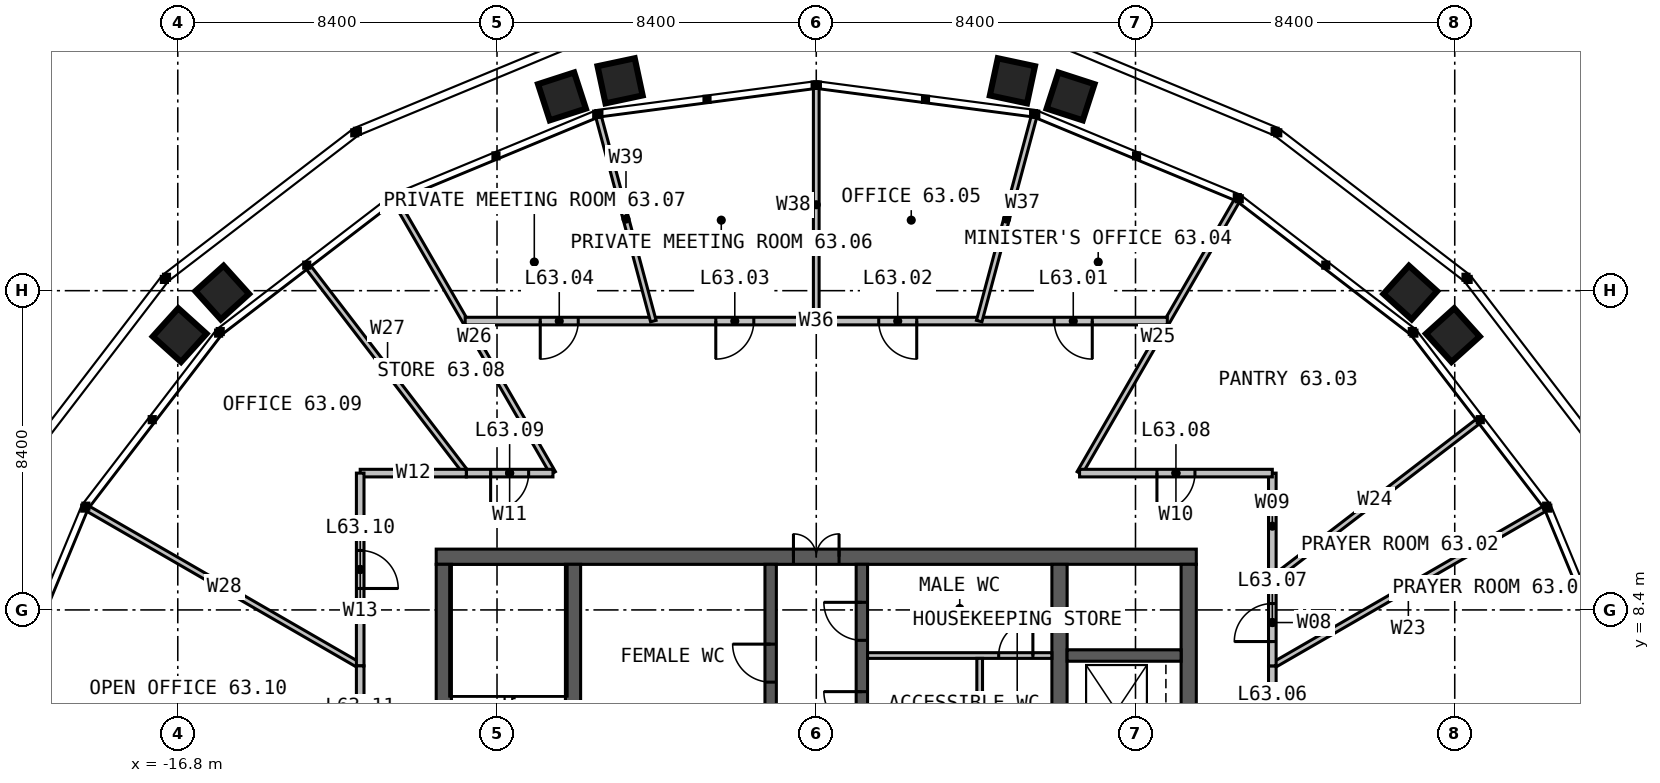
"""IFC4 building model, lengths in metres.
Left out: names, types, materials, properties, quantities, classifications, styles, units other than length and angle.
Written with IfcOpenShell. Run it as: python <this file> out.ifc"""

import sys

from ifc_helpers import new_model, si_unit, direction, frame, frame_2d, origin, place, context, subcontext, project, spatial, rectangle, extrude, element, fill, save


model = new_model("IFC4")
c1 = context("Model", 3, precision=1e-05, world=origin(), true_north=direction((0.0, 1.0)))
c2 = subcontext(c1, "Body", "Model", "MODEL_VIEW")
j1 = project(units=[si_unit("LENGTHUNIT", "METRE"), si_unit("PLANEANGLEUNIT", "RADIAN")], contexts=[c1])
p1 = place(None, origin())
s1 = spatial("IfcSite", under=j1, at=p1, CompositionType="ELEMENT")
p2 = place(p1, origin())
s2 = spatial("IfcBuilding", under=s1, at=p2, CompositionType="ELEMENT")
p3 = place(p2, frame((0.0, 0.0, 260.0)))
s3 = spatial("IfcBuildingStorey", under=s2, at=p3, CompositionType="ELEMENT", Elevation=260.0)
p4 = place(p3, frame((-10.0, 9.8, 0.0), z_axis=(0.0, 0.0, 1.0), x_axis=(1.0, 0.0, 0.0)))
e1 = element("IfcWall", 1, at=p4, inside=s3, PredefinedType="SOLIDWALL", context=c2, shape_type="SweptSolid", body=[
    extrude(rectangle(XDim=20.0, YDim=0.4, at=frame_2d((10.0, 0.0))), origin(), (0.0, 0.0, 1.0), 4.0),
])
p5 = place(p4, frame((9.4, 0.0, 0.0)))
e2 = element("IfcOpeningElement", 2, at=p5, cuts=e1, PredefinedType="OPENING", context=c2, shape_type="SweptSolid", body=[
    extrude(rectangle(XDim=1.2, YDim=2.2, at=frame_2d((0.6, 1.1))), frame((0.0, 0.21, 0.0), z_axis=(0.0, -1.0, 0.0), x_axis=(1.0, 0.0, 0.0)), (0.0, 0.0, 1.0), 0.42),
])
for number, where, z_axis, x_axis in (
    (3, (9.8, -9.6, 0.0), (0.0, 0.0, 1.0), (0.0, 1.0, 0.0)),
    (4, (-9.8, 9.6, 0.0), (0.0, 0.0, 1.0), (0.0, -1.0, 0.0)),
):
    element("IfcWall", number, at=place(p3, frame(where, z_axis=z_axis, x_axis=x_axis)), inside=s3, PredefinedType="SOLIDWALL", context=c2, shape_type="SweptSolid", body=[
        extrude(rectangle(XDim=19.2, YDim=0.4, at=frame_2d((9.6, 0.0))), origin(), (0.0, 0.0, 1.0), 4.0),
    ])
p6 = place(p3, frame((-6.4, -9.6, 0.0), z_axis=(0.0, 0.0, 1.0), x_axis=(0.0, 1.0, 0.0)))
e5 = element("IfcWall", 5, at=p6, inside=s3, PredefinedType="SOLIDWALL", context=c2, shape_type="SweptSolid", body=[
    extrude(rectangle(XDim=19.2, YDim=0.4, at=frame_2d((9.6, 0.0))), origin(), (0.0, 0.0, 1.0), 4.0),
])
p7 = place(p6, frame((9.1, 0.0, 0.0)))
e6 = element("IfcOpeningElement", 6, at=p7, cuts=e5, PredefinedType="OPENING", context=c2, shape_type="SweptSolid", body=[
    extrude(rectangle(XDim=1.0, YDim=2.2, at=frame_2d((0.5, 1.1))), frame((0.0, 0.21, 0.0), z_axis=(0.0, -1.0, 0.0), x_axis=(1.0, 0.0, 0.0)), (0.0, 0.0, 1.0), 0.42),
])
p8 = place(p3, frame((6.4, 9.6, 0.0), z_axis=(0.0, 0.0, 1.0), x_axis=(0.0, -1.0, 0.0)))
e7 = element("IfcWall", 7, at=p8, inside=s3, PredefinedType="SOLIDWALL", context=c2, shape_type="SweptSolid", body=[
    extrude(rectangle(XDim=19.2, YDim=0.4, at=frame_2d((9.6, 0.0))), origin(), (0.0, 0.0, 1.0), 4.0),
])
p9 = place(p8, frame((9.1, 0.0, 0.0)))
e8 = element("IfcOpeningElement", 8, at=p9, cuts=e7, PredefinedType="OPENING", context=c2, shape_type="SweptSolid", body=[
    extrude(rectangle(XDim=1.0, YDim=2.2, at=frame_2d((0.5, 1.1))), frame((0.0, 0.21, 0.0), z_axis=(0.0, -1.0, 0.0), x_axis=(1.0, 0.0, 0.0)), (0.0, 0.0, 1.0), 0.42),
])
p10 = place(p3, frame((-1.2, 1.45, 0.0), z_axis=(0.0, 0.0, 1.0), x_axis=(0.0, 1.0, 0.0)))
e9 = element("IfcWall", 9, at=p10, inside=s3, PredefinedType="SOLIDWALL", context=c2, shape_type="SweptSolid", body=[
    extrude(rectangle(XDim=8.15, YDim=0.3, at=frame_2d((4.075, 0.0))), origin(), (0.0, 0.0, 1.0), 4.0),
])
p11 = place(p10, frame((5.05, 0.0, 0.0)))
e10 = element("IfcOpeningElement", 10, at=p11, cuts=e9, PredefinedType="OPENING", context=c2, shape_type="SweptSolid", body=[
    extrude(rectangle(XDim=1.0, YDim=2.2, at=frame_2d((0.5, 1.1))), frame((0.0, 0.16, 0.0), z_axis=(0.0, -1.0, 0.0), x_axis=(1.0, 0.0, 0.0)), (0.0, 0.0, 1.0), 0.32),
])
p12 = place(p3, frame((1.2, 1.45, 0.0), z_axis=(0.0, 0.0, 1.0), x_axis=(0.0, 1.0, 0.0)))
e11 = element("IfcWall", 11, at=p12, inside=s3, PredefinedType="SOLIDWALL", context=c2, shape_type="SweptSolid", body=[
    extrude(rectangle(XDim=8.15, YDim=0.3, at=frame_2d((4.075, 0.0))), origin(), (0.0, 0.0, 1.0), 4.0),
])
p13 = place(p12, frame((3.8, 0.0, 0.0)))
e12 = element("IfcOpeningElement", 12, at=p13, cuts=e11, PredefinedType="OPENING", context=c2, shape_type="SweptSolid", body=[
    extrude(rectangle(XDim=1.0, YDim=2.2, at=frame_2d((0.5, 1.1))), frame((0.0, 0.16, 0.0), z_axis=(0.0, -1.0, 0.0), x_axis=(1.0, 0.0, 0.0)), (0.0, 0.0, 1.0), 0.32),
])
p14 = place(p12, frame((6.15, 0.0, 0.0)))
e13 = element("IfcOpeningElement", 13, at=p14, cuts=e11, PredefinedType="OPENING", context=c2, shape_type="SweptSolid", body=[
    extrude(rectangle(XDim=1.0, YDim=2.2, at=frame_2d((0.5, 1.1))), frame((0.0, 0.16, 0.0), z_axis=(0.0, -1.0, 0.0), x_axis=(1.0, 0.0, 0.0)), (0.0, 0.0, 1.0), 0.32),
])
p15 = place(p3, frame((6.6, 7.2, 0.0), z_axis=(0.0, 0.0, 1.0), x_axis=(1.0, 0.0, 0.0)))
e14 = element("IfcWall", 14, at=p15, inside=s3, PredefinedType="SOLIDWALL", context=c2, shape_type="SweptSolid", body=[
    extrude(rectangle(XDim=3.0, YDim=0.3, at=frame_2d((1.5, 0.0))), origin(), (0.0, 0.0, 1.0), 4.0),
])
p16 = place(p3, frame((1.35, 7.2, 0.0), z_axis=(0.0, 0.0, 1.0), x_axis=(1.0, 0.0, 0.0)))
e15 = element("IfcWall", 15, at=p16, inside=s3, PredefinedType="PARTITIONING", context=c2, shape_type="SweptSolid", body=[
    extrude(rectangle(XDim=4.85, YDim=0.15, at=frame_2d((2.425, 0.0))), origin(), (0.0, 0.0, 1.0), 3.75),
])
p17 = place(p16, frame((3.45, 0.0, 0.0)))
e16 = element("IfcOpeningElement", 16, at=p17, cuts=e15, PredefinedType="OPENING", context=c2, shape_type="SweptSolid", body=[
    extrude(rectangle(XDim=0.9, YDim=2.2, at=frame_2d((0.45, 1.1))), frame((0.0, 0.085, 0.0), z_axis=(0.0, -1.0, 0.0), x_axis=(1.0, 0.0, 0.0)), (0.0, 0.0, 1.0), 0.17),
])
p18 = place(p3, frame((4.3, 4.75, 0.0), z_axis=(0.0, 0.0, 1.0), x_axis=(0.0, 1.0, 0.0)))
e17 = element("IfcWall", 17, at=p18, inside=s3, PredefinedType="PARTITIONING", context=c2, shape_type="SweptSolid", body=[
    extrude(rectangle(XDim=2.375, YDim=0.15, at=frame_2d((1.188, 0.0))), origin(), (0.0, 0.0, 1.0), 3.75),
])
p19 = place(p3, frame((12.0, 6.928, 0.0), z_axis=(0.0, 0.0, 1.0), x_axis=(0.86603163534, 0.499989206474, 0.0)))
e18 = element("IfcWall", 18, at=p19, inside=s3, PredefinedType="PARTITIONING", context=c2, shape_type="SweptSolid", body=[
    extrude(rectangle(XDim=8.266, YDim=0.15, at=frame_2d((4.133, 0.0))), origin(), (0.0, 0.0, 1.0), 2.79),
])
p20 = place(p3, frame((12.0, 9.208, 0.0), z_axis=(0.0, 0.0, 1.0), x_axis=(0.793354038351, 0.608760519279, 0.0)))
e19 = element("IfcWall", 19, at=p20, inside=s3, PredefinedType="PARTITIONING", context=c2, shape_type="SweptSolid", body=[
    extrude(rectangle(XDim=6.807, YDim=0.15, at=frame_2d((3.404, 0.0))), origin(), (0.0, 0.0, 1.0), 2.79),
])
for number, where, z_axis, x_axis in (
    (20, (6.928, 12.0, 0.0), (0.0, 0.0, 1.0), (0.5, 0.866, 0.0)),
    (21, (-6.928, 12.0, 0.0), (0.0, 0.0, 1.0), (-0.5, 0.866, 0.0)),
):
    element("IfcWall", number, at=place(p3, frame(where, z_axis=z_axis, x_axis=x_axis)), inside=s3, PredefinedType="PARTITIONING", context=c2, shape_type="SweptSolid", body=[
        extrude(rectangle(XDim=8.266, YDim=0.15, at=frame_2d((4.133, 0.0))), origin(), (0.0, 0.0, 1.0), 2.79),
    ])
p21 = place(p3, frame((-9.208, 12.0, 0.0), z_axis=(0.0, 0.0, 1.0), x_axis=(-0.608760519279, 0.793354038351, 0.0)))
e22 = element("IfcWall", 22, at=p21, inside=s3, PredefinedType="PARTITIONING", context=c2, shape_type="SweptSolid", body=[
    extrude(rectangle(XDim=6.807, YDim=0.15, at=frame_2d((3.404, 0.0))), origin(), (0.0, 0.0, 1.0), 2.79),
])
p22 = place(p3, frame((-12.0, 6.928, 0.0), z_axis=(0.0, 0.0, 1.0), x_axis=(-0.86603163534, 0.499989206474, 0.0)))
e23 = element("IfcWall", 23, at=p22, inside=s3, PredefinedType="PARTITIONING", context=c2, shape_type="SweptSolid", body=[
    extrude(rectangle(XDim=8.266, YDim=0.15, at=frame_2d((4.133, 0.0))), origin(), (0.0, 0.0, 1.0), 2.79),
])
p23 = place(p3, frame((12.0, 3.215, 0.0), z_axis=(0.0, 0.0, 1.0), x_axis=(0.0, 1.0, 0.0)))
e24 = element("IfcWall", 24, at=p23, inside=s3, PredefinedType="PARTITIONING", context=c2, shape_type="SweptSolid", body=[
    extrude(rectangle(XDim=3.713, YDim=0.2, at=frame_2d((1.856, 0.0))), origin(), (0.0, 0.0, 1.0), 3.8),
])
p24 = place(p23, frame((1.356, 0.0, 0.0)))
e25 = element("IfcOpeningElement", 25, at=p24, cuts=e24, PredefinedType="OPENING", context=c2, shape_type="SweptSolid", body=[
    extrude(rectangle(XDim=1.0, YDim=2.2, at=frame_2d((0.5, 1.1))), frame((0.0, 0.11, 0.0), z_axis=(0.0, -1.0, 0.0), x_axis=(1.0, 0.0, 0.0)), (0.0, 0.0, 1.0), 0.22),
])
p25 = place(p3, frame((12.0, 6.928, 0.0), z_axis=(0.0, 0.0, 1.0), x_axis=(0.0, 1.0, 0.0)))
e26 = element("IfcWall", 26, at=p25, inside=s3, PredefinedType="PARTITIONING", context=c2, shape_type="SweptSolid", body=[
    extrude(rectangle(XDim=2.28, YDim=0.2, at=frame_2d((1.14, 0.0))), origin(), (0.0, 0.0, 1.0), 3.8),
])
p26 = place(p25, frame((0.64, 0.0, 0.0)))
e27 = element("IfcOpeningElement", 27, at=p26, cuts=e26, PredefinedType="OPENING", context=c2, shape_type="SweptSolid", body=[
    extrude(rectangle(XDim=1.0, YDim=2.2, at=frame_2d((0.5, 1.1))), frame((0.0, 0.11, 0.0), z_axis=(0.0, -1.0, 0.0), x_axis=(1.0, 0.0, 0.0)), (0.0, 0.0, 1.0), 0.22),
])
p27 = place(p3, frame((12.0, 9.208, 0.0), z_axis=(0.0, 0.0, 1.0), x_axis=(0.0, 1.0, 0.0)))
e28 = element("IfcWall", 28, at=p27, inside=s3, PredefinedType="PARTITIONING", context=c2, shape_type="SweptSolid", body=[
    extrude(rectangle(XDim=2.792, YDim=0.2, at=frame_2d((1.396, 0.0))), origin(), (0.0, 0.0, 1.0), 3.8),
])
p28 = place(p3, frame((12.0, 12.0, 0.0), z_axis=(0.0, 0.0, 1.0), x_axis=(-1.0, 0.0, 0.0)))
e29 = element("IfcWall", 29, at=p28, inside=s3, PredefinedType="PARTITIONING", context=c2, shape_type="SweptSolid", body=[
    extrude(rectangle(XDim=5.072, YDim=0.2, at=frame_2d((2.536, 0.0))), origin(), (0.0, 0.0, 1.0), 3.8),
])
p29 = place(p28, frame((2.036, 0.0, 0.0)))
e30 = element("IfcOpeningElement", 30, at=p29, cuts=e29, PredefinedType="OPENING", context=c2, shape_type="SweptSolid", body=[
    extrude(rectangle(XDim=1.0, YDim=2.2, at=frame_2d((0.5, 1.1))), frame((0.0, 0.11, 0.0), z_axis=(0.0, -1.0, 0.0), x_axis=(1.0, 0.0, 0.0)), (0.0, 0.0, 1.0), 0.22),
])
p30 = place(p3, frame((9.238, 16.0, 0.0), z_axis=(0.0, 0.0, 1.0), x_axis=(-1.0, 0.0, 0.0)))
e31 = element("IfcWall", 31, at=p30, inside=s3, PredefinedType="PARTITIONING", context=c2, shape_type="SweptSolid", body=[
    extrude(rectangle(XDim=18.475, YDim=0.2, at=frame_2d((9.238, 0.0))), origin(), (0.0, 0.0, 1.0), 3.8),
])
p31 = place(p30, frame((1.975, 0.0, 0.0)))
e32 = element("IfcOpeningElement", 32, at=p31, cuts=e31, PredefinedType="OPENING", context=c2, shape_type="SweptSolid", body=[
    extrude(rectangle(XDim=1.0, YDim=2.2, at=frame_2d((0.5, 1.1))), frame((0.0, 0.11, 0.0), z_axis=(0.0, -1.0, 0.0), x_axis=(1.0, 0.0, 0.0)), (0.0, 0.0, 1.0), 0.22),
])
p32 = place(p30, frame((6.594, 0.0, 0.0)))
e33 = element("IfcOpeningElement", 33, at=p32, cuts=e31, PredefinedType="OPENING", context=c2, shape_type="SweptSolid", body=[
    extrude(rectangle(XDim=1.0, YDim=2.2, at=frame_2d((0.5, 1.1))), frame((0.0, 0.11, 0.0), z_axis=(0.0, -1.0, 0.0), x_axis=(1.0, 0.0, 0.0)), (0.0, 0.0, 1.0), 0.22),
])
p33 = place(p30, frame((10.881, 0.0, 0.0)))
e34 = element("IfcOpeningElement", 34, at=p33, cuts=e31, PredefinedType="OPENING", context=c2, shape_type="SweptSolid", body=[
    extrude(rectangle(XDim=1.0, YDim=2.2, at=frame_2d((0.5, 1.1))), frame((0.0, 0.11, 0.0), z_axis=(0.0, -1.0, 0.0), x_axis=(1.0, 0.0, 0.0)), (0.0, 0.0, 1.0), 0.22),
])
p34 = place(p30, frame((15.5, 0.0, 0.0)))
e35 = element("IfcOpeningElement", 35, at=p34, cuts=e31, PredefinedType="OPENING", context=c2, shape_type="SweptSolid", body=[
    extrude(rectangle(XDim=1.0, YDim=2.2, at=frame_2d((0.5, 1.1))), frame((0.0, 0.11, 0.0), z_axis=(0.0, -1.0, 0.0), x_axis=(1.0, 0.0, 0.0)), (0.0, 0.0, 1.0), 0.22),
])
p35 = place(p3, frame((4.287, 16.0, 0.0), z_axis=(0.0, 0.0, 1.0), x_axis=(0.25882171764, 0.965925110181, 0.0)))
e36 = element("IfcWall", 36, at=p35, inside=s3, PredefinedType="PARTITIONING", context=c2, shape_type="SweptSolid", body=[
    extrude(rectangle(XDim=5.558, YDim=0.15, at=frame_2d((2.779, 0.0))), origin(), (0.0, 0.0, 1.0), 2.79),
])
p36 = place(p3, frame((0.0, 16.0, 0.0), z_axis=(0.0, 0.0, 1.0), x_axis=(0.0, 1.0, 0.0)))
e37 = element("IfcWall", 37, at=p36, inside=s3, PredefinedType="PARTITIONING", context=c2, shape_type="SweptSolid", body=[
    extrude(rectangle(XDim=6.122, YDim=0.15, at=frame_2d((3.061, 0.0))), origin(), (0.0, 0.0, 1.0), 2.79),
])
p37 = place(p3, frame((-4.287, 16.0, 0.0), z_axis=(0.0, 0.0, 1.0), x_axis=(-0.25882171764, 0.965925110181, 0.0)))
e38 = element("IfcWall", 38, at=p37, inside=s3, PredefinedType="PARTITIONING", context=c2, shape_type="SweptSolid", body=[
    extrude(rectangle(XDim=5.558, YDim=0.15, at=frame_2d((2.779, 0.0))), origin(), (0.0, 0.0, 1.0), 2.79),
])
p38 = place(p3, frame((-6.928, 12.0, 0.0), z_axis=(0.0, 0.0, 1.0), x_axis=(-1.0, 0.0, 0.0)))
e39 = element("IfcWall", 39, at=p38, inside=s3, PredefinedType="PARTITIONING", context=c2, shape_type="SweptSolid", body=[
    extrude(rectangle(XDim=2.28, YDim=0.2, at=frame_2d((1.14, 0.0))), origin(), (0.0, 0.0, 1.0), 3.8),
])
p39 = place(p38, frame((0.64, 0.0, 0.0)))
e40 = element("IfcOpeningElement", 40, at=p39, cuts=e39, PredefinedType="OPENING", context=c2, shape_type="SweptSolid", body=[
    extrude(rectangle(XDim=1.0, YDim=2.2, at=frame_2d((0.5, 1.1))), frame((0.0, 0.11, 0.0), z_axis=(0.0, -1.0, 0.0), x_axis=(1.0, 0.0, 0.0)), (0.0, 0.0, 1.0), 0.22),
])
p40 = place(p3, frame((-9.208, 12.0, 0.0), z_axis=(0.0, 0.0, 1.0), x_axis=(-1.0, 0.0, 0.0)))
e41 = element("IfcWall", 41, at=p40, inside=s3, PredefinedType="PARTITIONING", context=c2, shape_type="SweptSolid", body=[
    extrude(rectangle(XDim=2.792, YDim=0.2, at=frame_2d((1.396, 0.0))), origin(), (0.0, 0.0, 1.0), 3.8),
])
p41 = place(p3, frame((-12.0, 12.0, 0.0), z_axis=(0.0, 0.0, 1.0), x_axis=(0.0, -1.0, 0.0)))
e42 = element("IfcWall", 42, at=p41, inside=s3, PredefinedType="PARTITIONING", context=c2, shape_type="SweptSolid", body=[
    extrude(rectangle(XDim=5.072, YDim=0.2, at=frame_2d((2.536, 0.0))), origin(), (0.0, 0.0, 1.0), 3.8),
])
p42 = place(p41, frame((2.036, 0.0, 0.0)))
e43 = element("IfcOpeningElement", 43, at=p42, cuts=e42, PredefinedType="OPENING", context=c2, shape_type="SweptSolid", body=[
    extrude(rectangle(XDim=1.0, YDim=2.2, at=frame_2d((0.5, 1.1))), frame((0.0, 0.11, 0.0), z_axis=(0.0, -1.0, 0.0), x_axis=(1.0, 0.0, 0.0)), (0.0, 0.0, 1.0), 0.22),
])
p43 = place(p3, frame((-12.0, 6.928, 0.0), z_axis=(0.0, 0.0, 1.0), x_axis=(0.0, -1.0, 0.0)))
e44 = element("IfcWall", 44, at=p43, inside=s3, PredefinedType="PARTITIONING", context=c2, shape_type="SweptSolid", body=[
    extrude(rectangle(XDim=5.348, YDim=0.2, at=frame_2d((2.674, 0.0))), origin(), (0.0, 0.0, 1.0), 3.8),
])
p44 = place(p43, frame((1.774, 0.0, 0.0)))
e45 = element("IfcOpeningElement", 45, at=p44, cuts=e44, PredefinedType="OPENING", context=c2, shape_type="SweptSolid", body=[
    extrude(rectangle(XDim=1.8, YDim=2.2, at=frame_2d((0.9, 1.1))), frame((0.0, 0.11, 0.0), z_axis=(0.0, -1.0, 0.0), x_axis=(1.0, 0.0, 0.0)), (0.0, 0.0, 1.0), 0.22),
])
p45 = place(p5, origin())
e46 = element("IfcDoor", 46, at=p45, inside=s3, OperationType="DOUBLE_DOOR_SINGLE_SWING", PredefinedType="DOOR", context=c2, shape_type="SweptSolid", body=[
    extrude(rectangle(XDim=1.2, YDim=2.2, at=frame_2d((0.6, 1.1))), frame((0.0, 0.025, 0.0), z_axis=(0.0, -1.0, 0.0), x_axis=(1.0, 0.0, 0.0)), (0.0, 0.0, 1.0), 0.05),
])
fill(e2, e46)
p46 = place(p11, origin())
e47 = element("IfcDoor", 47, at=p46, inside=s3, OperationType="SINGLE_SWING_RIGHT", PredefinedType="DOOR", context=c2, shape_type="SweptSolid", body=[
    extrude(rectangle(XDim=1.0, YDim=2.2, at=frame_2d((0.5, 1.1))), frame((0.0, 0.025, 0.0), z_axis=(0.0, -1.0, 0.0), x_axis=(1.0, 0.0, 0.0)), (0.0, 0.0, 1.0), 0.05),
])
fill(e10, e47)
p47 = place(p13, origin())
e48 = element("IfcDoor", 48, at=p47, inside=s3, OperationType="SINGLE_SWING_RIGHT", PredefinedType="DOOR", context=c2, shape_type="SweptSolid", body=[
    extrude(rectangle(XDim=1.0, YDim=2.2, at=frame_2d((0.5, 1.1))), frame((0.0, 0.025, 0.0), z_axis=(0.0, -1.0, 0.0), x_axis=(1.0, 0.0, 0.0)), (0.0, 0.0, 1.0), 0.05),
])
fill(e12, e48)
p48 = place(p14, origin())
e49 = element("IfcDoor", 49, at=p48, inside=s3, OperationType="SINGLE_SWING_RIGHT", PredefinedType="DOOR", context=c2, shape_type="SweptSolid", body=[
    extrude(rectangle(XDim=1.0, YDim=2.2, at=frame_2d((0.5, 1.1))), frame((0.0, 0.025, 0.0), z_axis=(0.0, -1.0, 0.0), x_axis=(1.0, 0.0, 0.0)), (0.0, 0.0, 1.0), 0.05),
])
fill(e13, e49)
p49 = place(p17, origin())
e50 = element("IfcDoor", 50, at=p49, inside=s3, OperationType="SINGLE_SWING_RIGHT", PredefinedType="DOOR", context=c2, shape_type="SweptSolid", body=[
    extrude(rectangle(XDim=0.9, YDim=2.2, at=frame_2d((0.45, 1.1))), frame((0.0, 0.025, 0.0), z_axis=(0.0, -1.0, 0.0), x_axis=(1.0, 0.0, 0.0)), (0.0, 0.0, 1.0), 0.05),
])
fill(e16, e50)
p50 = place(p26, origin())
e51 = element("IfcDoor", 51, at=p50, inside=s3, OperationType="SINGLE_SWING_LEFT", PredefinedType="DOOR", context=c2, shape_type="SweptSolid", body=[
    extrude(rectangle(XDim=1.0, YDim=2.2, at=frame_2d((0.5, 1.1))), frame((0.0, 0.025, 0.0), z_axis=(0.0, -1.0, 0.0), x_axis=(1.0, 0.0, 0.0)), (0.0, 0.0, 1.0), 0.05),
])
fill(e27, e51)
p51 = place(p29, origin())
e52 = element("IfcDoor", 52, at=p51, inside=s3, OperationType="SINGLE_SWING_RIGHT", PredefinedType="DOOR", context=c2, shape_type="SweptSolid", body=[
    extrude(rectangle(XDim=1.0, YDim=2.2, at=frame_2d((0.5, 1.1))), frame((0.0, 0.025, 0.0), z_axis=(0.0, -1.0, 0.0), x_axis=(1.0, 0.0, 0.0)), (0.0, 0.0, 1.0), 0.05),
])
fill(e30, e52)
p52 = place(p31, origin())
e53 = element("IfcDoor", 53, at=p52, inside=s3, OperationType="SINGLE_SWING_LEFT", PredefinedType="DOOR", context=c2, shape_type="SweptSolid", body=[
    extrude(rectangle(XDim=1.0, YDim=2.2, at=frame_2d((0.5, 1.1))), frame((0.0, 0.025, 0.0), z_axis=(0.0, -1.0, 0.0), x_axis=(1.0, 0.0, 0.0)), (0.0, 0.0, 1.0), 0.05),
])
fill(e32, e53)
p53 = place(p32, origin())
e54 = element("IfcDoor", 54, at=p53, inside=s3, OperationType="SINGLE_SWING_LEFT", PredefinedType="DOOR", context=c2, shape_type="SweptSolid", body=[
    extrude(rectangle(XDim=1.0, YDim=2.2, at=frame_2d((0.5, 1.1))), frame((0.0, 0.025, 0.0), z_axis=(0.0, -1.0, 0.0), x_axis=(1.0, 0.0, 0.0)), (0.0, 0.0, 1.0), 0.05),
])
fill(e33, e54)
p54 = place(p33, origin())
e55 = element("IfcDoor", 55, at=p54, inside=s3, OperationType="SINGLE_SWING_RIGHT", PredefinedType="DOOR", context=c2, shape_type="SweptSolid", body=[
    extrude(rectangle(XDim=1.0, YDim=2.2, at=frame_2d((0.5, 1.1))), frame((0.0, 0.025, 0.0), z_axis=(0.0, -1.0, 0.0), x_axis=(1.0, 0.0, 0.0)), (0.0, 0.0, 1.0), 0.05),
])
fill(e34, e55)
p55 = place(p34, origin())
e56 = element("IfcDoor", 56, at=p55, inside=s3, OperationType="SINGLE_SWING_RIGHT", PredefinedType="DOOR", context=c2, shape_type="SweptSolid", body=[
    extrude(rectangle(XDim=1.0, YDim=2.2, at=frame_2d((0.5, 1.1))), frame((0.0, 0.025, 0.0), z_axis=(0.0, -1.0, 0.0), x_axis=(1.0, 0.0, 0.0)), (0.0, 0.0, 1.0), 0.05),
])
fill(e35, e56)
p56 = place(p39, origin())
e57 = element("IfcDoor", 57, at=p56, inside=s3, OperationType="SINGLE_SWING_RIGHT", PredefinedType="DOOR", context=c2, shape_type="SweptSolid", body=[
    extrude(rectangle(XDim=1.0, YDim=2.2, at=frame_2d((0.5, 1.1))), frame((0.0, 0.025, 0.0), z_axis=(0.0, -1.0, 0.0), x_axis=(1.0, 0.0, 0.0)), (0.0, 0.0, 1.0), 0.05),
])
fill(e40, e57)
p57 = place(p42, origin())
e58 = element("IfcDoor", 58, at=p57, inside=s3, OperationType="SINGLE_SWING_RIGHT", PredefinedType="DOOR", context=c2, shape_type="SweptSolid", body=[
    extrude(rectangle(XDim=1.0, YDim=2.2, at=frame_2d((0.5, 1.1))), frame((0.0, 0.025, 0.0), z_axis=(0.0, -1.0, 0.0), x_axis=(1.0, 0.0, 0.0)), (0.0, 0.0, 1.0), 0.05),
])
fill(e43, e58)
save(model, sys.argv[1])
